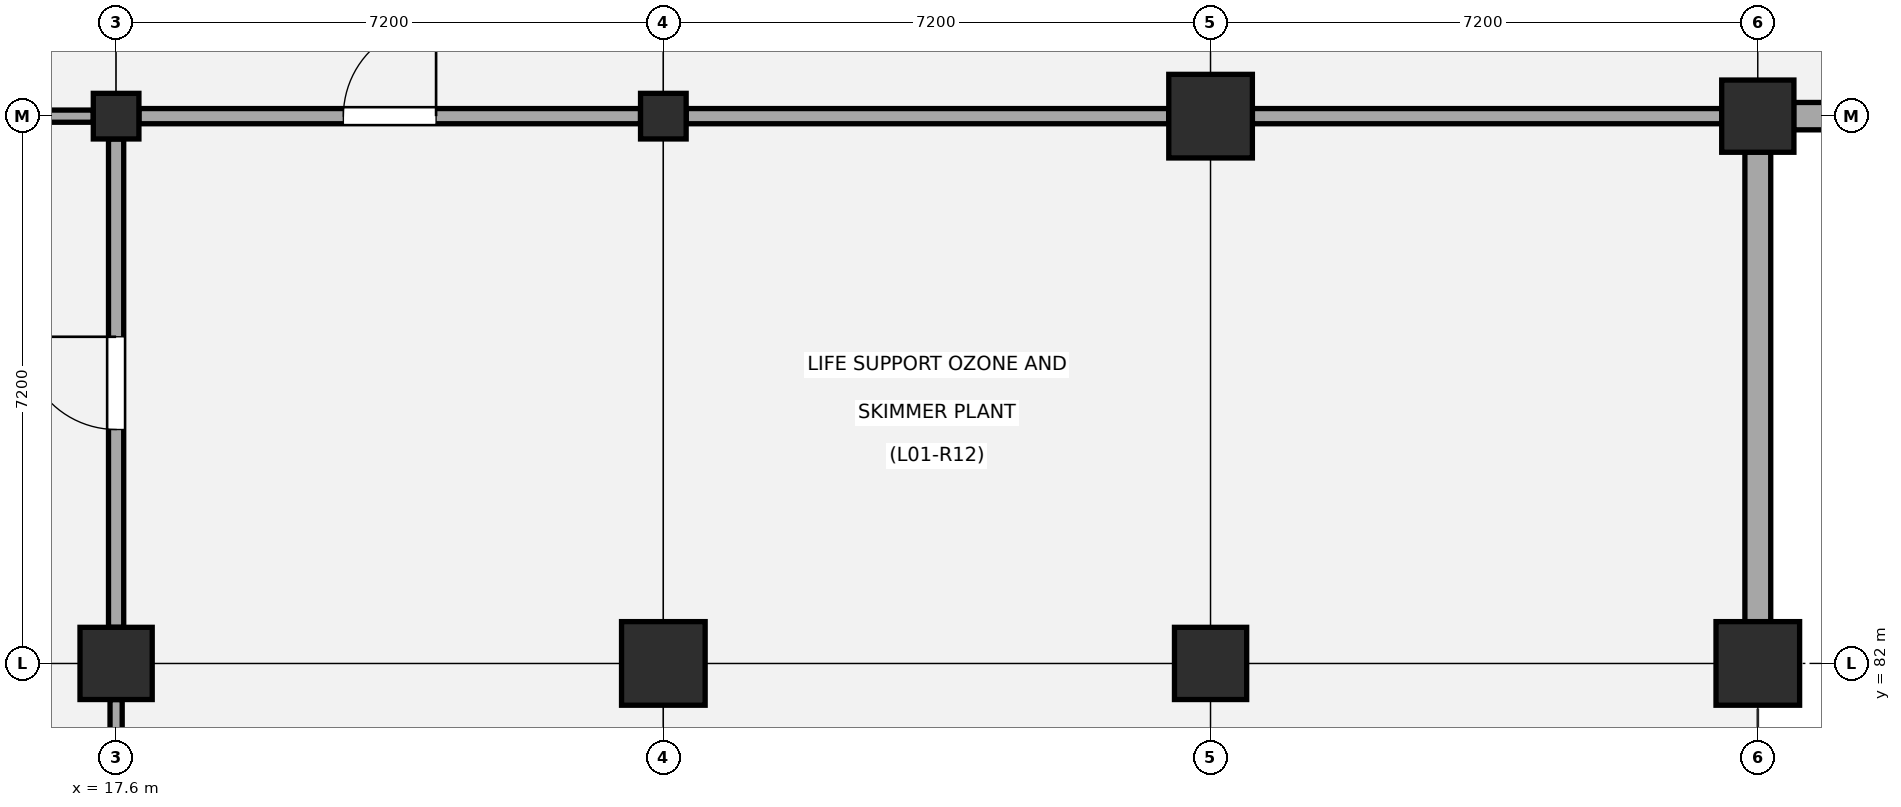
"""IFC4 building model, lengths in metres.
Left out: names, types, materials, properties, quantities, classifications, styles, units other than length and angle.
Written with IfcOpenShell. Run it as: python <this file> out.ifc"""

import sys

from ifc_helpers import new_model, si_unit, direction, frame, frame_2d, origin, origin_2d, place, context, subcontext, project, spatial, rectangle, extrude, element, fill, save


model = new_model("IFC4")
c1 = context("Model", 3, precision=1e-05, world=origin(), true_north=direction((0.0, 1.0)))
c2 = subcontext(c1, "Body", "Model", "MODEL_VIEW")
j1 = project(units=[si_unit("LENGTHUNIT", "METRE"), si_unit("PLANEANGLEUNIT", "RADIAN")], contexts=[c1])
p1 = place(None, origin())
s1 = spatial("IfcSite", under=j1, at=p1, CompositionType="ELEMENT")
p2 = place(p1, origin())
s2 = spatial("IfcBuilding", under=s1, at=p2, CompositionType="ELEMENT")
p3 = place(p2, frame((0.0, 0.0, 4.68)))
s3 = spatial("IfcBuildingStorey", under=s2, at=p3, CompositionType="ELEMENT", Elevation=4.68)
p4 = place(p3, frame((17.6, 82.0, 0.0), z_axis=(0.0, 0.0, 1.0), x_axis=(1.0, 0.0, 0.0)))
e1 = element("IfcColumn", 1, at=p4, inside=s3, PredefinedType="COLUMN", context=c2, shape_type="SweptSolid", body=[
    extrude(rectangle(XDim=0.95, YDim=0.95, at=origin_2d()), origin(), (0.0, 0.0, 1.0), 4.5),
])
p5 = place(p3, frame((17.6, 89.2, 0.0), z_axis=(0.0, 0.0, 1.0), x_axis=(1.0, 0.0, 0.0)))
e2 = element("IfcColumn", 2, at=p5, inside=s3, PredefinedType="COLUMN", context=c2, shape_type="SweptSolid", body=[
    extrude(rectangle(XDim=0.6, YDim=0.6, at=origin_2d()), origin(), (0.0, 0.0, 1.0), 4.5),
])
p6 = place(p3, frame((24.8, 82.0, 0.0), z_axis=(0.0, 0.0, 1.0), x_axis=(1.0, 0.0, 0.0)))
e3 = element("IfcColumn", 3, at=p6, inside=s3, PredefinedType="COLUMN", context=c2, shape_type="SweptSolid", body=[
    extrude(rectangle(XDim=1.1, YDim=1.1, at=origin_2d()), origin(), (0.0, 0.0, 1.0), 4.5),
])
p7 = place(p3, frame((24.8, 89.2, 0.0), z_axis=(0.0, 0.0, 1.0), x_axis=(1.0, 0.0, 0.0)))
e4 = element("IfcColumn", 4, at=p7, inside=s3, PredefinedType="COLUMN", context=c2, shape_type="SweptSolid", body=[
    extrude(rectangle(XDim=0.6, YDim=0.6, at=origin_2d()), origin(), (0.0, 0.0, 1.0), 4.5),
])
p8 = place(p3, frame((32.0, 82.0, 0.0), z_axis=(0.0, 0.0, 1.0), x_axis=(1.0, 0.0, 0.0)))
e5 = element("IfcColumn", 5, at=p8, inside=s3, PredefinedType="COLUMN", context=c2, shape_type="SweptSolid", body=[
    extrude(rectangle(XDim=0.95, YDim=0.95, at=origin_2d()), origin(), (0.0, 0.0, 1.0), 4.5),
])
for number, where, z_axis, x_axis in (
    (6, (32.0, 89.2, 0.0), (0.0, 0.0, 1.0), (1.0, 0.0, 0.0)),
    (7, (39.2, 82.0, 0.0), (0.0, 0.0, 1.0), (1.0, 0.0, 0.0)),
):
    element("IfcColumn", number, at=place(p3, frame(where, z_axis=z_axis, x_axis=x_axis)), inside=s3, PredefinedType="COLUMN", context=c2, shape_type="SweptSolid", body=[
        extrude(rectangle(XDim=1.1, YDim=1.1, at=origin_2d()), origin(), (0.0, 0.0, 1.0), 4.5),
    ])
p9 = place(p3, frame((39.2, 89.2, 0.0), z_axis=(0.0, 0.0, 1.0), x_axis=(1.0, 0.0, 0.0)))
e8 = element("IfcColumn", 8, at=p9, inside=s3, PredefinedType="COLUMN", context=c2, shape_type="SweptSolid", body=[
    extrude(rectangle(XDim=0.95, YDim=0.95, at=origin_2d()), origin(), (0.0, 0.0, 1.0), 4.5),
])
p10 = place(p3, frame((46.105, 89.2, 0.0), z_axis=(0.0, 0.0, 1.0), x_axis=(-1.0, 0.0, 0.0)))
e9 = element("IfcWall", 9, at=p10, inside=s3, PredefinedType="STANDARD", context=c2, shape_type="SweptSolid", body=[
    extrude(rectangle(XDim=6.435, YDim=0.36, at=frame_2d((3.218, 0.0))), origin(), (0.0, 0.0, 1.0), 3.51),
])
p11 = place(p10, frame((2.542, 0.0, 0.95)))
e10 = element("IfcOpeningElement", 10, at=p11, cuts=e9, PredefinedType="OPENING", context=c2, shape_type="SweptSolid", body=[
    extrude(rectangle(XDim=1.35, YDim=1.2, at=frame_2d((0.675, 0.6))), frame((0.0, 0.19, 0.0), z_axis=(0.0, -1.0, 0.0), x_axis=(1.0, 0.0, 0.0)), (0.0, 0.0, 1.0), 0.38),
])
p12 = place(p3, frame((39.2, 88.73, 0.0), z_axis=(0.0, 0.0, 1.0), x_axis=(0.0, -1.0, 0.0)))
e11 = element("IfcWall", 11, at=p12, inside=s3, PredefinedType="STANDARD", context=c2, shape_type="SweptSolid", body=[
    extrude(rectangle(XDim=6.185, YDim=0.34, at=frame_2d((3.093, 0.0))), origin(), (0.0, 0.0, 1.0), 3.51),
])
p13 = place(p3, frame((17.6, 75.35, 0.0), z_axis=(0.0, 0.0, 1.0), x_axis=(0.0, 1.0, 0.0)))
e12 = element("IfcWall", 12, at=p13, inside=s3, PredefinedType="PARTITIONING", context=c2, shape_type="SweptSolid", body=[
    extrude(rectangle(XDim=6.175, YDim=0.16, at=frame_2d((3.087, 0.0))), origin(), (0.0, 0.0, 1.0), 3.54),
])
p14 = place(p3, frame((17.6, 82.475, 0.0), z_axis=(0.0, 0.0, 1.0), x_axis=(0.0, 1.0, 0.0)))
e13 = element("IfcWall", 13, at=p14, inside=s3, PredefinedType="PARTITIONING", context=c2, shape_type="SweptSolid", body=[
    extrude(rectangle(XDim=6.425, YDim=0.2, at=frame_2d((3.212, 0.0))), origin(), (0.0, 0.0, 1.0), 3.59),
])
p15 = place(p14, frame((2.603, 0.0, 0.0)))
e14 = element("IfcOpeningElement", 14, at=p15, cuts=e13, PredefinedType="OPENING", context=c2, shape_type="SweptSolid", body=[
    extrude(rectangle(XDim=1.22, YDim=2.16, at=frame_2d((0.61, 1.08))), frame((0.0, 0.11, 0.0), z_axis=(0.0, -1.0, 0.0), x_axis=(1.0, 0.0, 0.0)), (0.0, 0.0, 1.0), 0.22),
])
p16 = place(p3, frame((10.7, 89.2, 0.0), z_axis=(0.0, 0.0, 1.0), x_axis=(1.0, 0.0, 0.0)))
e15 = element("IfcWall", 15, at=p16, inside=s3, PredefinedType="PARTITIONING", context=c2, shape_type="SweptSolid", body=[
    extrude(rectangle(XDim=6.6, YDim=0.16, at=frame_2d((3.3, 0.0))), origin(), (0.0, 0.0, 1.0), 3.59),
])
p17 = place(p16, frame((2.37, 0.0, 0.0)))
e16 = element("IfcOpeningElement", 16, at=p17, cuts=e15, PredefinedType="OPENING", context=c2, shape_type="SweptSolid", body=[
    extrude(rectangle(XDim=1.86, YDim=2.26, at=frame_2d((0.93, 1.13))), frame((0.0, 0.09, 0.0), z_axis=(0.0, -1.0, 0.0), x_axis=(1.0, 0.0, 0.0)), (0.0, 0.0, 1.0), 0.18),
])
p18 = place(p3, frame((17.9, 89.2, 0.0), z_axis=(0.0, 0.0, 1.0), x_axis=(1.0, 0.0, 0.0)))
e17 = element("IfcWall", 17, at=p18, inside=s3, PredefinedType="PARTITIONING", context=c2, shape_type="SweptSolid", body=[
    extrude(rectangle(XDim=6.6, YDim=0.2, at=frame_2d((3.3, 0.0))), origin(), (0.0, 0.0, 1.0), 3.54),
])
p19 = place(p18, frame((2.69, 0.0, 0.0)))
e18 = element("IfcOpeningElement", 18, at=p19, cuts=e17, PredefinedType="OPENING", context=c2, shape_type="SweptSolid", body=[
    extrude(rectangle(XDim=1.22, YDim=2.16, at=frame_2d((0.61, 1.08))), frame((0.0, 0.11, 0.0), z_axis=(0.0, -1.0, 0.0), x_axis=(1.0, 0.0, 0.0)), (0.0, 0.0, 1.0), 0.22),
])
p20 = place(p3, frame((25.1, 89.2, 0.0), z_axis=(0.0, 0.0, 1.0), x_axis=(1.0, 0.0, 0.0)))
e19 = element("IfcWall", 19, at=p20, inside=s3, PredefinedType="PARTITIONING", context=c2, shape_type="SweptSolid", body=[
    extrude(rectangle(XDim=6.35, YDim=0.2, at=frame_2d((3.175, 0.0))), origin(), (0.0, 0.0, 1.0), 3.59),
])
p21 = place(p3, frame((32.55, 89.2, 0.0), z_axis=(0.0, 0.0, 1.0), x_axis=(1.0, 0.0, 0.0)))
e20 = element("IfcWall", 20, at=p21, inside=s3, PredefinedType="PARTITIONING", context=c2, shape_type="SweptSolid", body=[
    extrude(rectangle(XDim=6.175, YDim=0.2, at=frame_2d((3.087, 0.0))), origin(), (0.0, 0.0, 1.0), 3.54),
])
p22 = place(p19, origin())
e21 = element("IfcDoor", 21, at=p22, inside=s3, OperationType="SINGLE_SWING_RIGHT", PredefinedType="DOOR", context=c2, shape_type="SweptSolid", body=[
    extrude(rectangle(XDim=1.22, YDim=2.16, at=frame_2d((0.61, 1.08))), frame((0.0, 0.025, 0.0), z_axis=(0.0, -1.0, 0.0), x_axis=(1.0, 0.0, 0.0)), (0.0, 0.0, 1.0), 0.05),
])
fill(e18, e21)
p23 = place(p15, origin())
e22 = element("IfcDoor", 22, at=p23, inside=s3, OperationType="SINGLE_SWING_RIGHT", PredefinedType="DOOR", context=c2, shape_type="SweptSolid", body=[
    extrude(rectangle(XDim=1.22, YDim=2.16, at=frame_2d((0.61, 1.08))), frame((0.0, 0.025, 0.0), z_axis=(0.0, -1.0, 0.0), x_axis=(1.0, 0.0, 0.0)), (0.0, 0.0, 1.0), 0.05),
])
fill(e14, e22)
save(model, sys.argv[1])
